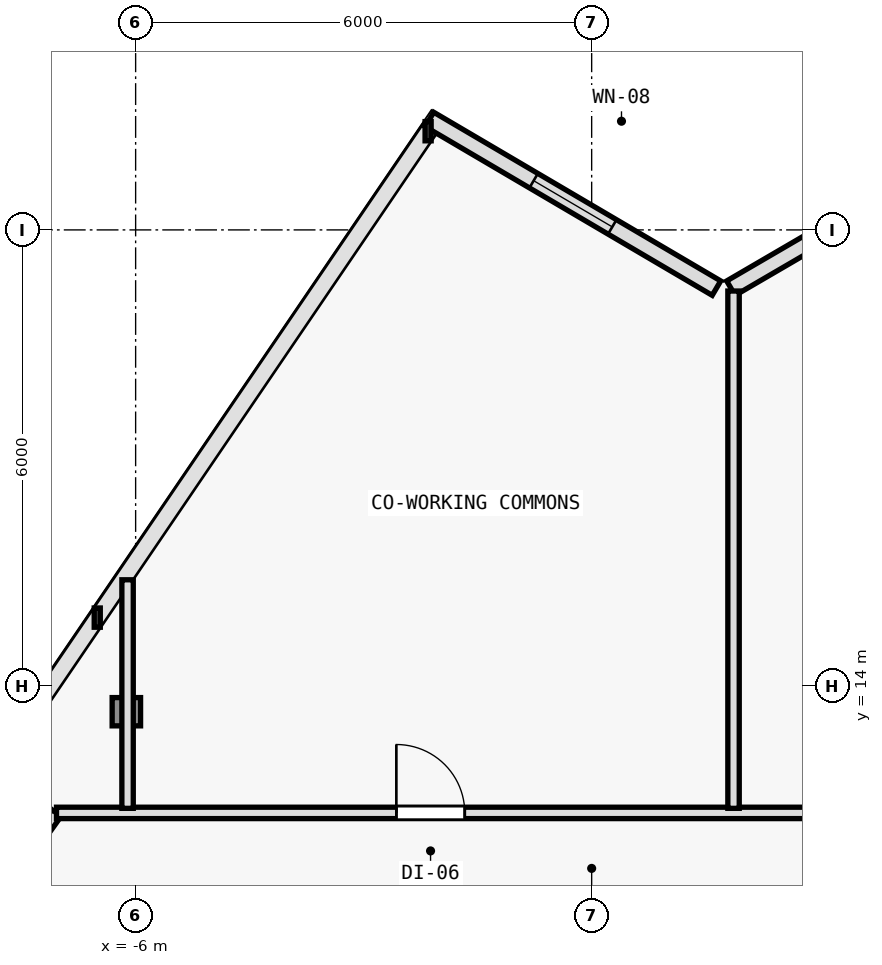
"""IFC4 building model, lengths in metres.
Left out: names, types, materials, properties, quantities, classifications, styles, units other than length and angle.
Written with IfcOpenShell. Run it as: python <this file> out.ifc"""

import sys

from ifc_helpers import new_model, si_unit, direction, frame, frame_2d, origin, origin_2d, place, context, subcontext, project, spatial, rectangle, i_section, extrude, element, fill, save


model = new_model("IFC4")
c1 = context("Model", 3, precision=1e-05, world=origin(), true_north=direction((0.0, 1.0)))
c2 = subcontext(c1, "Body", "Model", "MODEL_VIEW")
j1 = project(units=[si_unit("LENGTHUNIT", "METRE"), si_unit("PLANEANGLEUNIT", "RADIAN")], contexts=[c1])
p1 = place(None, origin())
s1 = spatial("IfcSite", under=j1, at=p1, CompositionType="ELEMENT")
p2 = place(p1, origin())
s2 = spatial("IfcBuilding", under=s1, at=p2, CompositionType="ELEMENT")
p3 = place(p2, frame((0.0, 0.0, 246.3)))
s3 = spatial("IfcBuildingStorey", under=s2, at=p3, CompositionType="ELEMENT", Elevation=246.3)
p4 = place(p3, frame((-6.122, 13.661, 0.005), z_axis=(0.007070021631, -0.002012236926, 0.999972982483), x_axis=(0.273743828055, 0.961802639112, 0.0)))
e1 = element("IfcColumn", 1, at=p4, inside=s3, PredefinedType="COLUMN", context=c2, shape_type="SweptSolid", body=[
    extrude(i_section(OverallWidth=0.374, OverallDepth=0.372, WebThickness=0.012, FlangeThickness=0.02, FilletRadius=0.015, at=origin_2d()), origin(), (0.0, 0.0, 1.0), 4.489),
])
p5 = place(p3, frame((1.832, 19.234, 0.0), z_axis=(0.0, 0.0, 1.0), x_axis=(0.86397765749, 0.503530145432, 0.0)))
e2 = element("IfcWall", 2, at=p5, inside=s3, PredefinedType="SOLIDWALL", context=c2, shape_type="SweptSolid", body=[
    extrude(rectangle(XDim=3.964, YDim=0.22, at=frame_2d((1.982, 0.0))), origin(), (0.0, 0.0, 1.0), 4.25),
])
p6 = place(p3, frame((-2.134, 21.453, 0.0), z_axis=(0.0, 0.0, 1.0), x_axis=(0.862106131527, -0.506727755292, 0.0)))
e3 = element("IfcWall", 3, at=p6, inside=s3, PredefinedType="SOLIDWALL", context=c2, shape_type="SweptSolid", body=[
    extrude(rectangle(XDim=4.38, YDim=0.22, at=frame_2d((2.19, 0.0))), origin(), (0.0, 0.0, 1.0), 4.25),
])
p7 = place(p6, frame((1.59, 0.0, 0.62)))
e4 = element("IfcOpeningElement", 4, at=p7, cuts=e3, PredefinedType="OPENING", context=c2, shape_type="SweptSolid", body=[
    extrude(rectangle(XDim=1.2, YDim=1.8, at=frame_2d((0.6, 0.9))), frame((0.0, 0.12, 0.0), z_axis=(0.0, -1.0, 0.0), x_axis=(1.0, 0.0, 0.0)), (0.0, 0.0, 1.0), 0.24),
])
p8 = place(p3, frame((-9.83, 8.426, 0.0), z_axis=(0.0, 0.0, 1.0), x_axis=(0.581218941111, 0.813747222725, 0.0)))
e5 = element("IfcWall", 5, at=p8, inside=s3, PredefinedType="PARTITIONING", context=c2, shape_type="SweptSolid", body=[
    extrude(rectangle(XDim=4.798, YDim=0.15, at=frame_2d((2.399, 0.0))), origin(), (0.0, 0.0, 1.0), 3.875),
])
p9 = place(p8, frame((1.049, 0.0, 0.0)))
e6 = element("IfcOpeningElement", 6, at=p9, cuts=e5, PredefinedType="OPENING", context=c2, shape_type="SweptSolid", body=[
    extrude(rectangle(XDim=0.9, YDim=2.1, at=frame_2d((0.45, 1.05))), frame((0.0, 0.085, 0.0), z_axis=(0.0, -1.0, 0.0), x_axis=(1.0, 0.0, 0.0)), (0.0, 0.0, 1.0), 0.17),
])
p10 = place(p3, frame((-7.041, 12.33, 0.0), z_axis=(0.0, 0.0, 1.0), x_axis=(1.0, 0.0, 0.0)))
e7 = element("IfcWall", 7, at=p10, inside=s3, PredefinedType="PARTITIONING", context=c2, shape_type="SweptSolid", body=[
    extrude(rectangle(XDim=14.083, YDim=0.15, at=frame_2d((7.041, 0.0))), origin(), (0.0, 0.0, 1.0), 3.875),
])
p11 = place(p10, frame((10.956, 0.0, 0.0)))
e8 = element("IfcOpeningElement", 8, at=p11, cuts=e7, PredefinedType="OPENING", context=c2, shape_type="SweptSolid", body=[
    extrude(rectangle(XDim=0.9, YDim=2.1, at=frame_2d((0.45, 1.05))), frame((0.0, 0.085, 0.0), z_axis=(0.0, -1.0, 0.0), x_axis=(1.0, 0.0, 0.0)), (0.0, 0.0, 1.0), 0.17),
])
p12 = place(p10, frame((4.471, 0.0, 0.0)))
e9 = element("IfcOpeningElement", 9, at=p12, cuts=e7, PredefinedType="OPENING", context=c2, shape_type="SweptSolid", body=[
    extrude(rectangle(XDim=0.9, YDim=2.1, at=frame_2d((0.45, 1.05))), frame((0.0, 0.085, 0.0), z_axis=(0.0, -1.0, 0.0), x_axis=(1.0, 0.0, 0.0)), (0.0, 0.0, 1.0), 0.17),
])
p13 = place(p3, frame((-6.106, 12.39, 0.0), z_axis=(0.0, 0.0, 1.0), x_axis=(0.0, 1.0, 0.0)))
e10 = element("IfcWall", 10, at=p13, inside=s3, PredefinedType="PARTITIONING", context=c2, shape_type="SweptSolid", body=[
    extrude(rectangle(XDim=3.007, YDim=0.15, at=frame_2d((1.503, 0.0))), origin(), (0.0, 0.0, 1.0), 3.875),
])
p14 = place(p3, frame((1.867, 12.39, 0.0), z_axis=(0.0, 0.0, 1.0), x_axis=(0.0, 1.0, 0.0)))
e11 = element("IfcWall", 11, at=p14, inside=s3, PredefinedType="PARTITIONING", context=c2, shape_type="SweptSolid", body=[
    extrude(rectangle(XDim=6.806, YDim=0.15, at=frame_2d((3.403, 0.0))), origin(), (0.0, 0.0, 1.0), 3.875),
])
p15 = place(p7, origin())
e12 = element("IfcWindow", 12, at=p15, inside=s3, PartitioningType="SINGLE_PANEL", PredefinedType="WINDOW", context=c2, shape_type="SweptSolid", body=[
    extrude(rectangle(XDim=1.2, YDim=1.8, at=frame_2d((0.6, 0.9))), frame((0.0, 0.03, 0.0), z_axis=(0.0, -1.0, 0.0), x_axis=(1.0, 0.0, 0.0)), (0.0, 0.0, 1.0), 0.06),
])
fill(e4, e12)
p16 = place(p12, origin())
e13 = element("IfcDoor", 13, at=p16, inside=s3, OperationType="SINGLE_SWING_LEFT", PredefinedType="DOOR", context=c2, shape_type="SweptSolid", body=[
    extrude(rectangle(XDim=0.9, YDim=2.1, at=frame_2d((0.45, 1.05))), frame((0.0, 0.025, 0.0), z_axis=(0.0, -1.0, 0.0), x_axis=(1.0, 0.0, 0.0)), (0.0, 0.0, 1.0), 0.05),
])
fill(e9, e13)
save(model, sys.argv[1])
